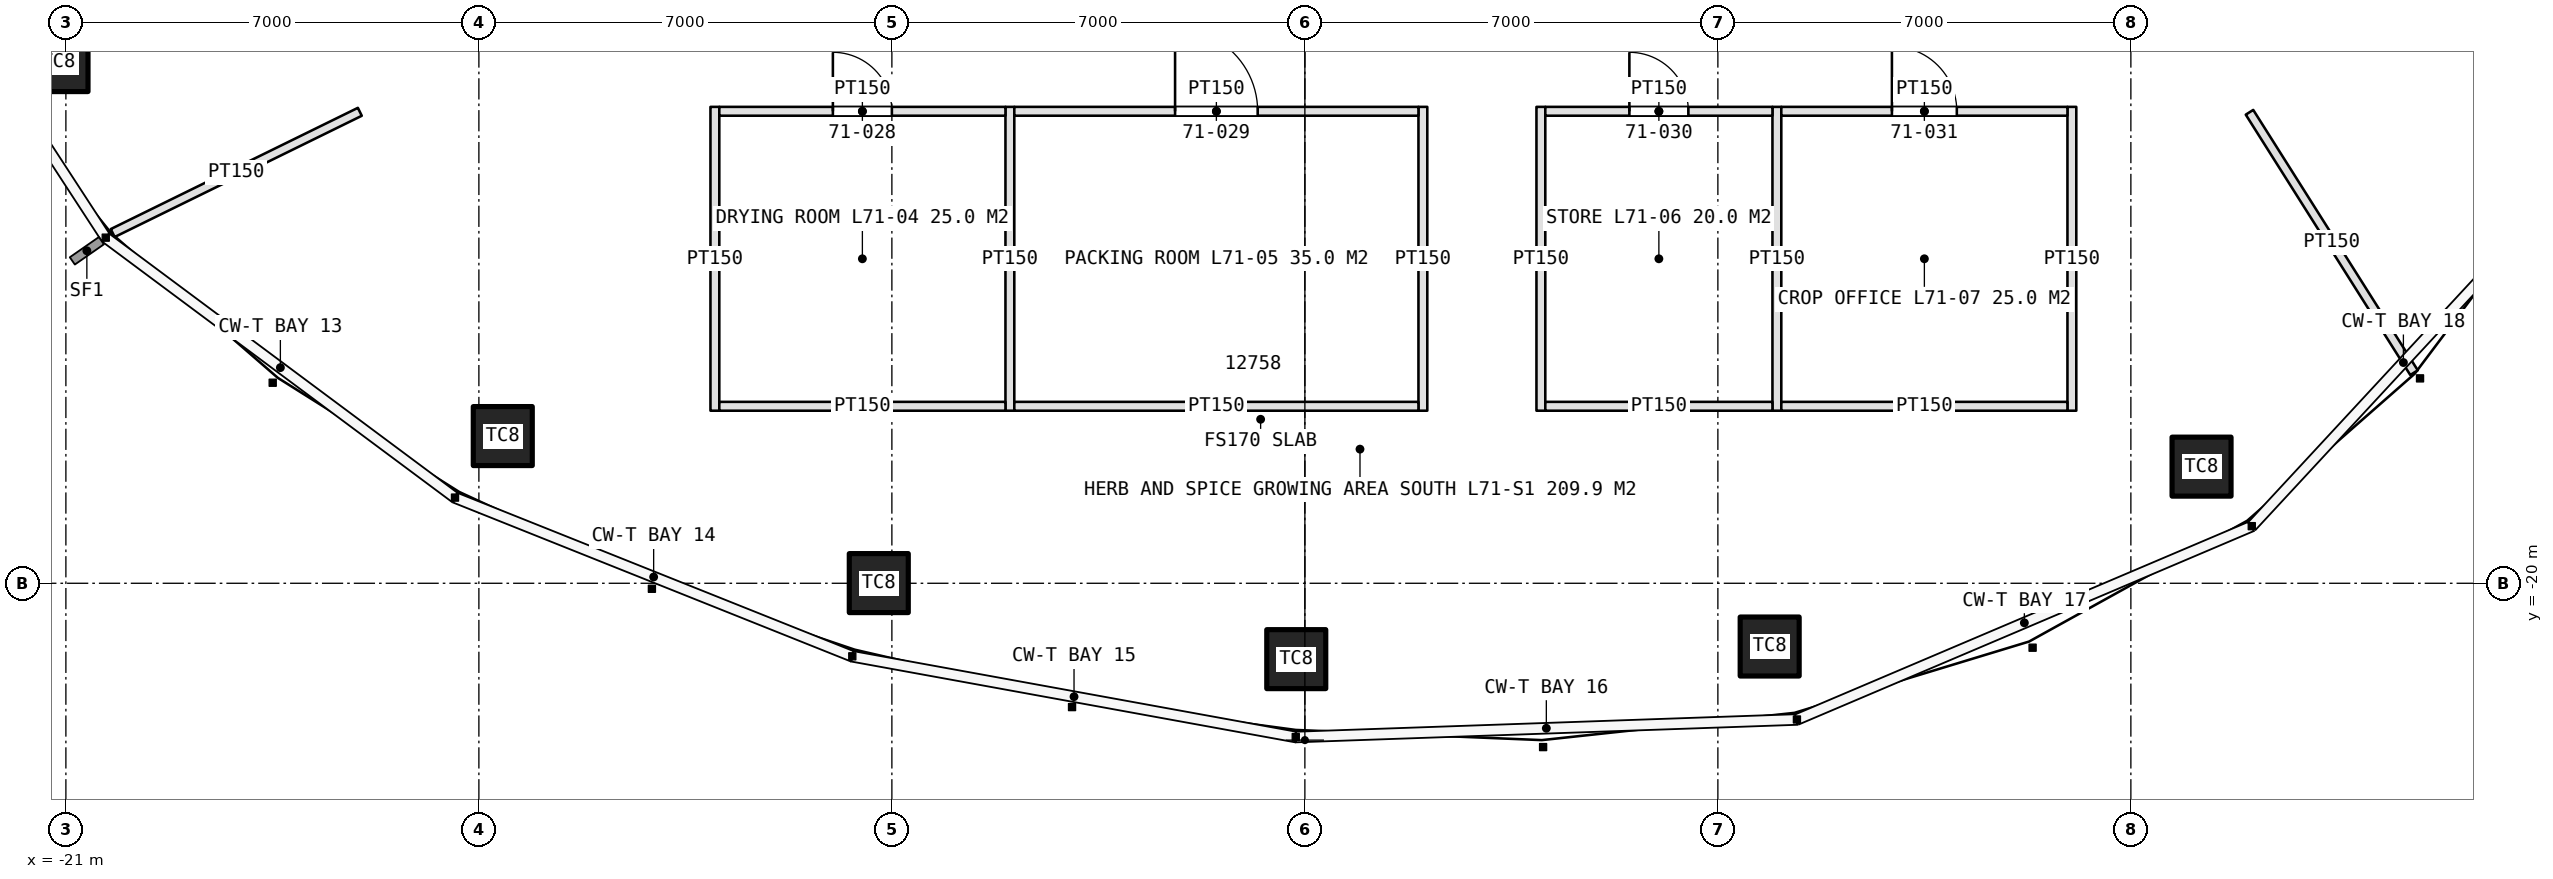
"""IFC4 building model, lengths in metres.
Left out: names, types, materials, properties, quantities, classifications, styles, units other than length and angle.
Written with IfcOpenShell. Run it as: python <this file> out.ifc"""

import sys

from ifc_helpers import new_model, si_unit, direction, frame, frame_2d, origin, origin_2d, place, context, subcontext, project, spatial, rectangle, extrude, element, fill, save


model = new_model("IFC4")
c1 = context("Model", 3, precision=1e-05, world=origin(), true_north=direction((0.0, 1.0)))
c2 = subcontext(c1, "Body", "Model", "MODEL_VIEW")
j1 = project(units=[si_unit("LENGTHUNIT", "METRE"), si_unit("PLANEANGLEUNIT", "RADIAN")], contexts=[c1])
p1 = place(None, origin())
s1 = spatial("IfcSite", under=j1, at=p1, CompositionType="ELEMENT")
p2 = place(p1, origin())
s2 = spatial("IfcBuilding", under=s1, at=p2, CompositionType="ELEMENT")
p3 = place(p2, frame((0.0, 0.0, 317.4)))
s3 = spatial("IfcBuildingStorey", under=s2, at=p3, CompositionType="ELEMENT", Elevation=317.4)
for number, where, z_axis, x_axis in (
    (1, (-21.125, -11.166, 0.0), (0.0, 0.0, 1.0), (1.0, 0.0, 0.0)),
    (2, (-13.595, -17.505, 0.0), (0.0, 0.0, 1.0), (1.0, 0.0, 0.0)),
    (3, (-7.222, -19.997, 0.0), (0.0, 0.0, 1.0), (1.0, 0.0, 0.0)),
    (4, (-0.146, -21.286, 0.0), (0.0, 0.0, 1.0), (1.0, 0.0, 0.0)),
    (5, (7.878, -21.072, 0.0), (0.0, 0.0, 1.0), (1.0, 0.0, 0.0)),
    (6, (15.198, -18.023, 0.0), (0.0, 0.0, 1.0), (1.0, 0.0, 0.0)),
):
    element("IfcColumn", number, at=place(p3, frame(where, z_axis=z_axis, x_axis=x_axis)), inside=s3, PredefinedType="COLUMN", context=c2, shape_type="SweptSolid", body=[
        extrude(rectangle(XDim=1.0, YDim=1.0, at=origin_2d()), origin(), (0.0, 0.0, 1.0), 4.2),
    ])
for number, where, z_axis, x_axis in (
    (7, (-10.0, -11.925, 0.0), (0.0, 0.0, 1.0), (0.0, -1.0, 0.0)),
    (8, (-5.0, -11.925, 0.0), (0.0, 0.0, 1.0), (0.0, -1.0, 0.0)),
    (9, (2.0, -11.925, 0.0), (0.0, 0.0, 1.0), (0.0, -1.0, 0.0)),
):
    element("IfcWall", number, at=place(p3, frame(where, z_axis=z_axis, x_axis=x_axis)), inside=s3, PredefinedType="PARTITIONING", context=c2, shape_type="SweptSolid", body=[
        extrude(rectangle(XDim=5.15, YDim=0.15, at=frame_2d((2.575, 0.0))), origin(), (0.0, 0.0, 1.0), 3.0),
    ])
p4 = place(p3, frame((-9.925, -12.0, 0.0), z_axis=(0.0, 0.0, 1.0), x_axis=(1.0, 0.0, 0.0)))
e10 = element("IfcWall", 10, at=p4, inside=s3, PredefinedType="PARTITIONING", context=c2, shape_type="SweptSolid", body=[
    extrude(rectangle(XDim=4.85, YDim=0.15, at=frame_2d((2.425, 0.0))), origin(), (0.0, 0.0, 1.0), 3.0),
])
p5 = place(p4, frame((1.925, 0.0, 0.0)))
e11 = element("IfcOpeningElement", 11, at=p5, cuts=e10, PredefinedType="OPENING", context=c2, shape_type="SweptSolid", body=[
    extrude(rectangle(XDim=1.0, YDim=2.2, at=frame_2d((0.5, 1.1))), frame((0.0, 0.085, 0.0), z_axis=(0.0, -1.0, 0.0), x_axis=(1.0, 0.0, 0.0)), (0.0, 0.0, 1.0), 0.17),
])
p6 = place(p3, frame((-9.925, -17.0, 0.0), z_axis=(0.0, 0.0, 1.0), x_axis=(1.0, 0.0, 0.0)))
e12 = element("IfcWall", 12, at=p6, inside=s3, PredefinedType="PARTITIONING", context=c2, shape_type="SweptSolid", body=[
    extrude(rectangle(XDim=4.85, YDim=0.15, at=frame_2d((2.425, 0.0))), origin(), (0.0, 0.0, 1.0), 3.0),
])
p7 = place(p3, frame((-4.925, -12.0, 0.0), z_axis=(0.0, 0.0, 1.0), x_axis=(1.0, 0.0, 0.0)))
e13 = element("IfcWall", 13, at=p7, inside=s3, PredefinedType="PARTITIONING", context=c2, shape_type="SweptSolid", body=[
    extrude(rectangle(XDim=6.85, YDim=0.15, at=frame_2d((3.425, 0.0))), origin(), (0.0, 0.0, 1.0), 3.0),
])
p8 = place(p7, frame((2.725, 0.0, 0.0)))
e14 = element("IfcOpeningElement", 14, at=p8, cuts=e13, PredefinedType="OPENING", context=c2, shape_type="SweptSolid", body=[
    extrude(rectangle(XDim=1.4, YDim=2.4, at=frame_2d((0.7, 1.2))), frame((0.0, 0.085, 0.0), z_axis=(0.0, -1.0, 0.0), x_axis=(1.0, 0.0, 0.0)), (0.0, 0.0, 1.0), 0.17),
])
p9 = place(p3, frame((-4.925, -17.0, 0.0), z_axis=(0.0, 0.0, 1.0), x_axis=(1.0, 0.0, 0.0)))
e15 = element("IfcWall", 15, at=p9, inside=s3, PredefinedType="PARTITIONING", context=c2, shape_type="SweptSolid", body=[
    extrude(rectangle(XDim=6.85, YDim=0.15, at=frame_2d((3.425, 0.0))), origin(), (0.0, 0.0, 1.0), 3.0),
])
for number, where, z_axis, x_axis in (
    (16, (4.0, -11.925, 0.0), (0.0, 0.0, 1.0), (0.0, -1.0, 0.0)),
    (17, (8.0, -11.925, 0.0), (0.0, 0.0, 1.0), (0.0, -1.0, 0.0)),
    (18, (13.0, -11.925, 0.0), (0.0, 0.0, 1.0), (0.0, -1.0, 0.0)),
):
    element("IfcWall", number, at=place(p3, frame(where, z_axis=z_axis, x_axis=x_axis)), inside=s3, PredefinedType="PARTITIONING", context=c2, shape_type="SweptSolid", body=[
        extrude(rectangle(XDim=5.15, YDim=0.15, at=frame_2d((2.575, 0.0))), origin(), (0.0, 0.0, 1.0), 3.0),
    ])
p10 = place(p3, frame((4.075, -12.0, 0.0), z_axis=(0.0, 0.0, 1.0), x_axis=(1.0, 0.0, 0.0)))
e19 = element("IfcWall", 19, at=p10, inside=s3, PredefinedType="PARTITIONING", context=c2, shape_type="SweptSolid", body=[
    extrude(rectangle(XDim=3.85, YDim=0.15, at=frame_2d((1.925, 0.0))), origin(), (0.0, 0.0, 1.0), 3.0),
])
p11 = place(p10, frame((1.425, 0.0, 0.0)))
e20 = element("IfcOpeningElement", 20, at=p11, cuts=e19, PredefinedType="OPENING", context=c2, shape_type="SweptSolid", body=[
    extrude(rectangle(XDim=1.0, YDim=2.2, at=frame_2d((0.5, 1.1))), frame((0.0, 0.085, 0.0), z_axis=(0.0, -1.0, 0.0), x_axis=(1.0, 0.0, 0.0)), (0.0, 0.0, 1.0), 0.17),
])
p12 = place(p3, frame((4.075, -17.0, 0.0), z_axis=(0.0, 0.0, 1.0), x_axis=(1.0, 0.0, 0.0)))
e21 = element("IfcWall", 21, at=p12, inside=s3, PredefinedType="PARTITIONING", context=c2, shape_type="SweptSolid", body=[
    extrude(rectangle(XDim=3.85, YDim=0.15, at=frame_2d((1.925, 0.0))), origin(), (0.0, 0.0, 1.0), 3.0),
])
p13 = place(p3, frame((8.075, -12.0, 0.0), z_axis=(0.0, 0.0, 1.0), x_axis=(1.0, 0.0, 0.0)))
e22 = element("IfcWall", 22, at=p13, inside=s3, PredefinedType="PARTITIONING", context=c2, shape_type="SweptSolid", body=[
    extrude(rectangle(XDim=4.85, YDim=0.15, at=frame_2d((2.425, 0.0))), origin(), (0.0, 0.0, 1.0), 3.0),
])
p14 = place(p13, frame((1.875, 0.0, 0.0)))
e23 = element("IfcOpeningElement", 23, at=p14, cuts=e22, PredefinedType="OPENING", context=c2, shape_type="SweptSolid", body=[
    extrude(rectangle(XDim=1.1, YDim=2.3, at=frame_2d((0.55, 1.15))), frame((0.0, 0.085, 0.0), z_axis=(0.0, -1.0, 0.0), x_axis=(1.0, 0.0, 0.0)), (0.0, 0.0, 1.0), 0.17),
])
p15 = place(p3, frame((8.075, -17.0, 0.0), z_axis=(0.0, 0.0, 1.0), x_axis=(1.0, 0.0, 0.0)))
e24 = element("IfcWall", 24, at=p15, inside=s3, PredefinedType="PARTITIONING", context=c2, shape_type="SweptSolid", body=[
    extrude(rectangle(XDim=4.85, YDim=0.15, at=frame_2d((2.425, 0.0))), origin(), (0.0, 0.0, 1.0), 3.0),
])
p16 = place(p3, frame((-16.018, -12.009, 0.0), z_axis=(0.0, 0.0, 1.0), x_axis=(-0.897771840996, -0.440460805879, 0.0)))
e25 = element("IfcWall", 25, at=p16, inside=s3, PredefinedType="PARTITIONING", context=c2, shape_type="SweptSolid", body=[
    extrude(rectangle(XDim=4.666, YDim=0.15, at=frame_2d((2.333, 0.0))), origin(), (0.0, 0.0, 1.0), 3.0),
])
p17 = place(p3, frame((16.011, -12.017, 0.0), z_axis=(0.0, 0.0, 1.0), x_axis=(0.53415837449, -0.845384427916, 0.0)))
e26 = element("IfcWall", 26, at=p17, inside=s3, PredefinedType="PARTITIONING", context=c2, shape_type="SweptSolid", body=[
    extrude(rectangle(XDim=5.22, YDim=0.15, at=frame_2d((2.61, 0.0))), origin(), (0.0, 0.0, 1.0), 3.0),
])
p18 = place(p5, origin())
e27 = element("IfcDoor", 27, at=p18, inside=s3, OperationType="SINGLE_SWING_LEFT", PredefinedType="DOOR", context=c2, shape_type="SweptSolid", body=[
    extrude(rectangle(XDim=1.0, YDim=2.2, at=frame_2d((0.5, 1.1))), frame((0.0, 0.025, 0.0), z_axis=(0.0, -1.0, 0.0), x_axis=(1.0, 0.0, 0.0)), (0.0, 0.0, 1.0), 0.05),
])
fill(e11, e27)
p19 = place(p8, origin())
e28 = element("IfcDoor", 28, at=p19, inside=s3, OperationType="DOUBLE_DOOR_DOUBLE_SWING", PredefinedType="DOOR", context=c2, shape_type="SweptSolid", body=[
    extrude(rectangle(XDim=1.4, YDim=2.4, at=frame_2d((0.7, 1.2))), frame((0.0, 0.025, 0.0), z_axis=(0.0, -1.0, 0.0), x_axis=(1.0, 0.0, 0.0)), (0.0, 0.0, 1.0), 0.05),
])
fill(e14, e28)
p20 = place(p11, origin())
e29 = element("IfcDoor", 29, at=p20, inside=s3, OperationType="SINGLE_SWING_LEFT", PredefinedType="DOOR", context=c2, shape_type="SweptSolid", body=[
    extrude(rectangle(XDim=1.0, YDim=2.2, at=frame_2d((0.5, 1.1))), frame((0.0, 0.025, 0.0), z_axis=(0.0, -1.0, 0.0), x_axis=(1.0, 0.0, 0.0)), (0.0, 0.0, 1.0), 0.05),
])
fill(e20, e29)
p21 = place(p14, origin())
e30 = element("IfcDoor", 30, at=p21, inside=s3, OperationType="SINGLE_SWING_LEFT", PredefinedType="DOOR", context=c2, shape_type="SweptSolid", body=[
    extrude(rectangle(XDim=1.1, YDim=2.3, at=frame_2d((0.55, 1.15))), frame((0.0, 0.025, 0.0), z_axis=(0.0, -1.0, 0.0), x_axis=(1.0, 0.0, 0.0)), (0.0, 0.0, 1.0), 0.05),
])
fill(e23, e30)
save(model, sys.argv[1])
